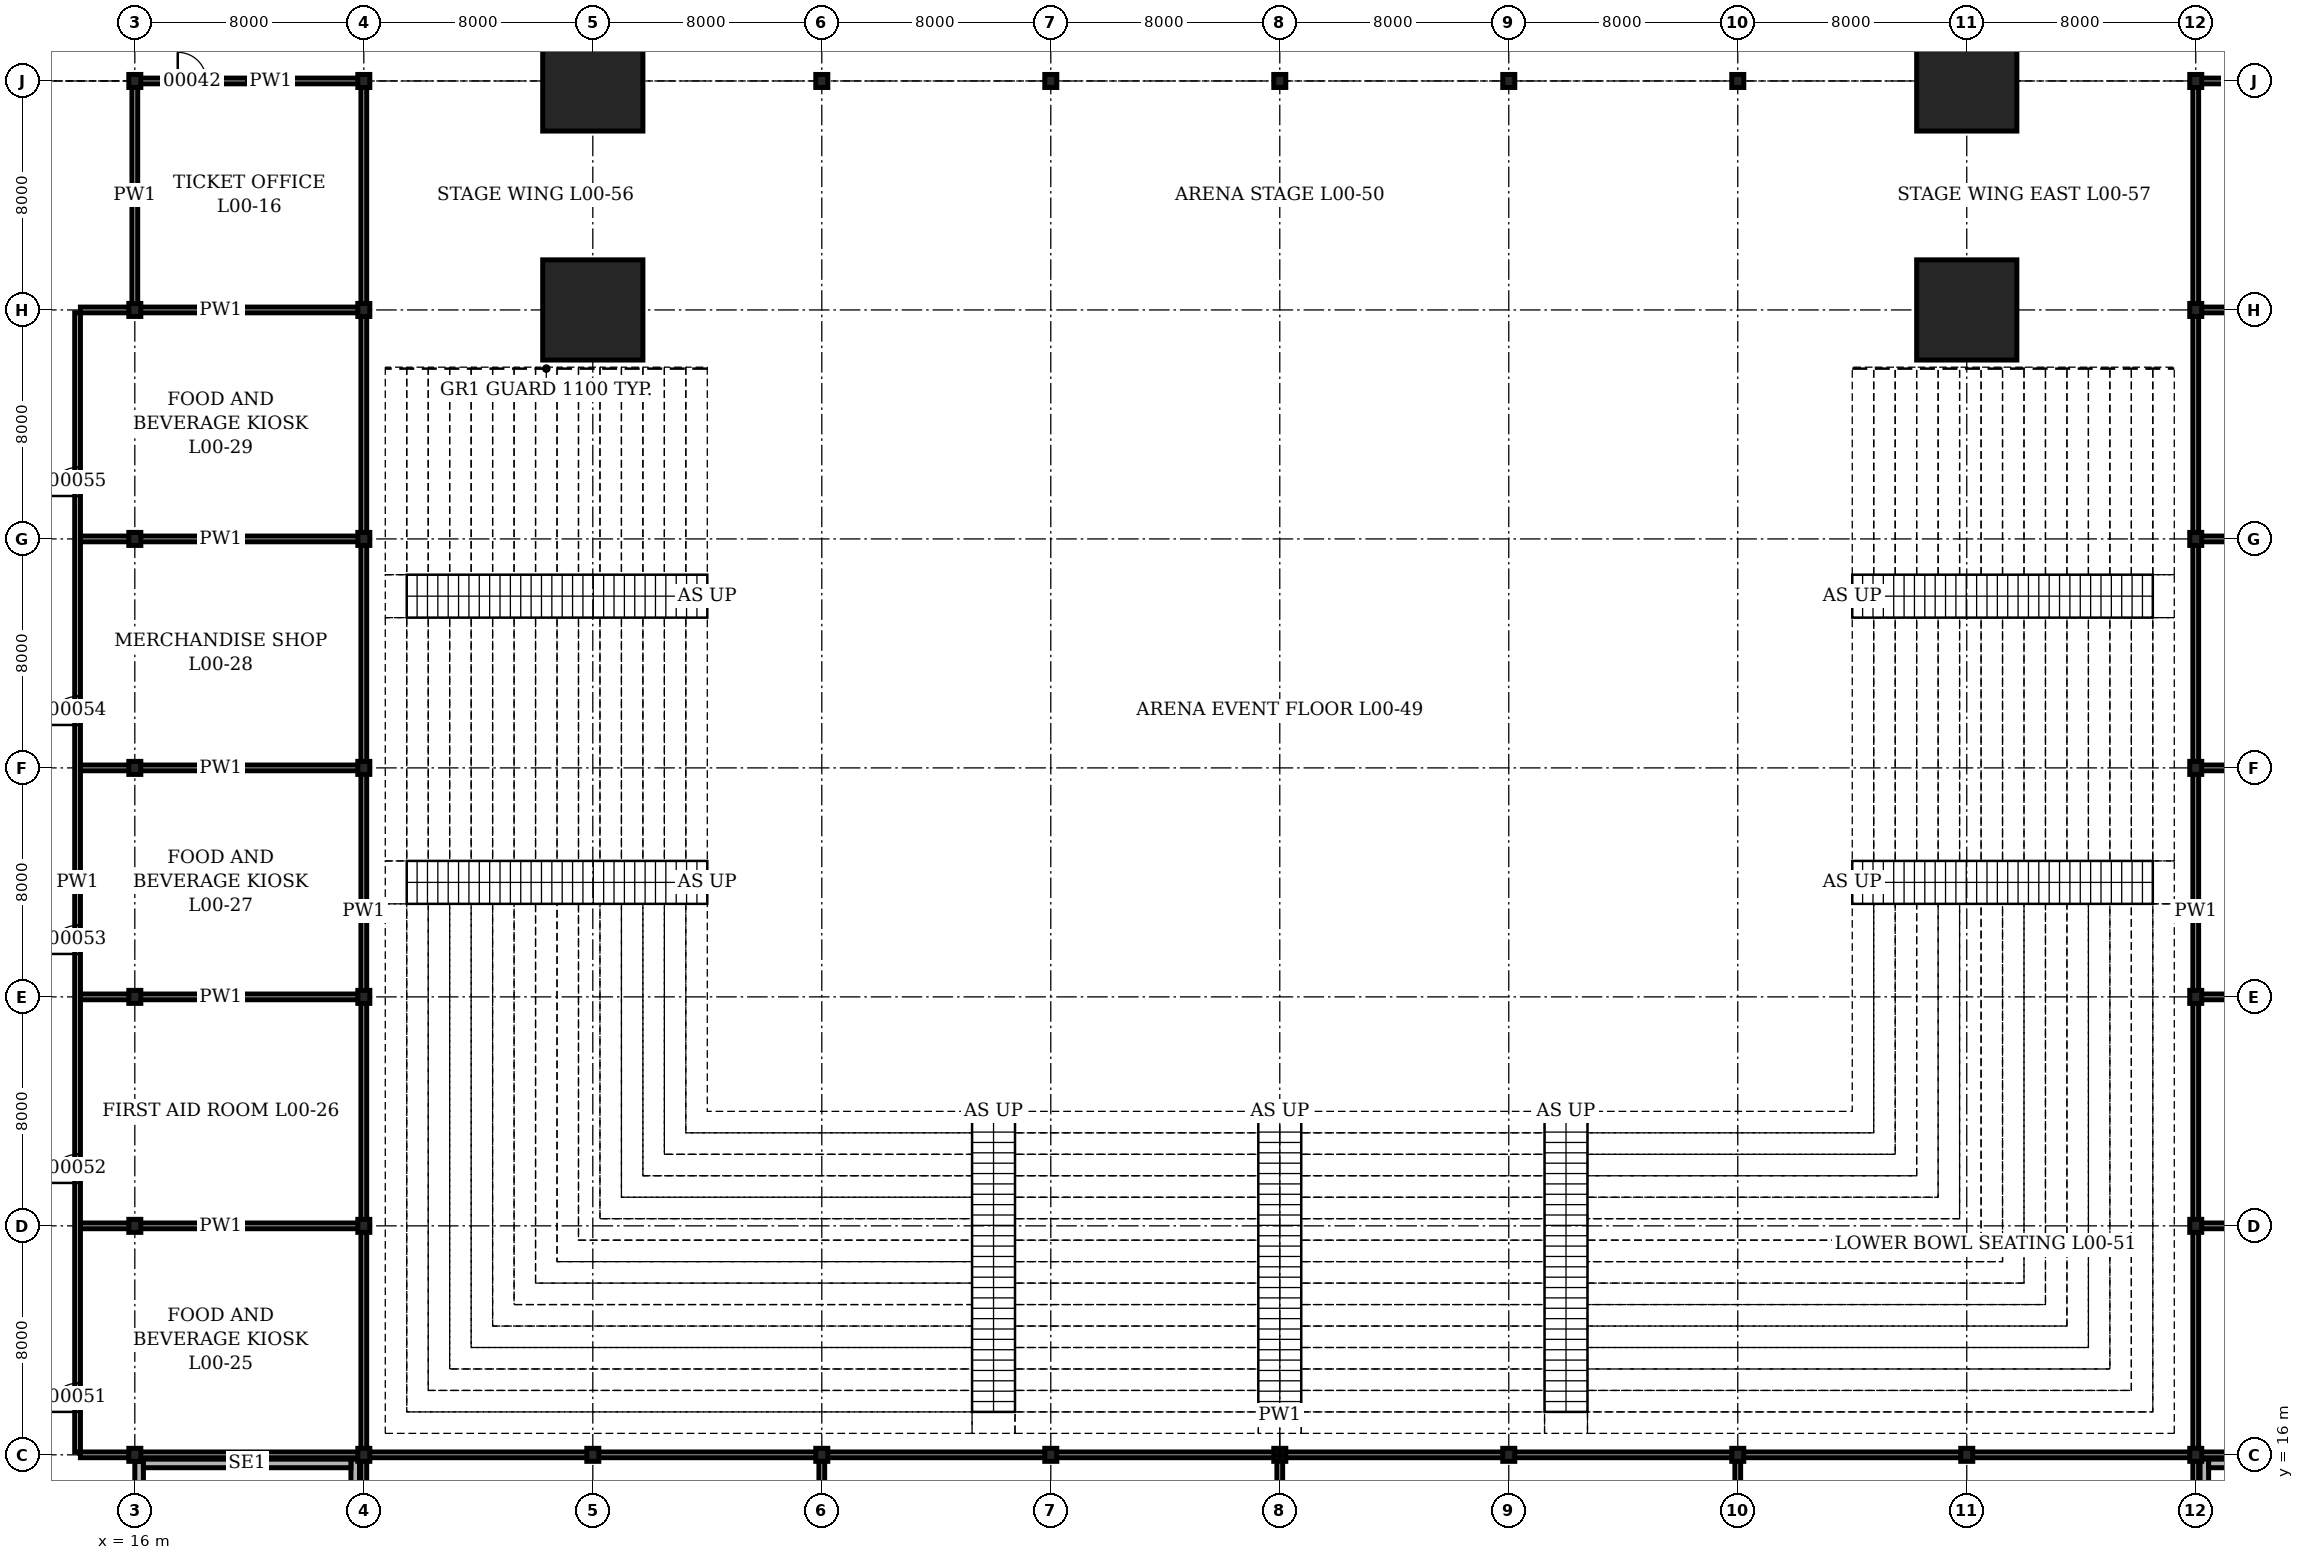
"""IFC4 building model, lengths in metres.
Left out: names, types, materials, properties, quantities, classifications, styles, units other than length and angle.
Written with IfcOpenShell. Run it as: python <this file> out.ifc"""

import sys

from ifc_helpers import new_model, si_unit, direction, frame, frame_2d, origin, origin_2d, place, context, subcontext, project, spatial, rectangle, hollow_rectangle, i_section, extrude, element, fill, save


model = new_model("IFC4")
c1 = context("Model", 3, precision=1e-05, world=origin(), true_north=direction((0.0, 1.0)))
c2 = subcontext(c1, "Body", "Model", "MODEL_VIEW")
j1 = project(units=[si_unit("LENGTHUNIT", "METRE"), si_unit("PLANEANGLEUNIT", "RADIAN")], contexts=[c1])
p1 = place(None, origin())
s1 = spatial("IfcSite", under=j1, at=p1, CompositionType="ELEMENT")
p2 = place(p1, origin())
s2 = spatial("IfcBuilding", under=s1, at=p2, CompositionType="ELEMENT")
p3 = place(p2, origin())
s3 = spatial("IfcBuildingStorey", under=s2, at=p3, CompositionType="ELEMENT", Elevation=0.0)
for number, where, z_axis, x_axis in (
    (1, (16.0, 16.0, 0.0), (0.0, 0.0, 1.0), (1.0, 0.0, 0.0)),
    (2, (16.0, 24.0, 0.0), (0.0, 0.0, 1.0), (1.0, 0.0, 0.0)),
    (3, (16.0, 32.0, 0.0), (0.0, 0.0, 1.0), (1.0, 0.0, 0.0)),
    (4, (16.0, 40.0, 0.0), (0.0, 0.0, 1.0), (1.0, 0.0, 0.0)),
    (5, (16.0, 48.0, 0.0), (0.0, 0.0, 1.0), (1.0, 0.0, 0.0)),
    (6, (16.0, 56.0, 0.0), (0.0, 0.0, 1.0), (1.0, 0.0, 0.0)),
    (7, (16.0, 64.0, 0.0), (0.0, 0.0, 1.0), (1.0, 0.0, 0.0)),
    (8, (24.0, 16.0, 0.0), (0.0, 0.0, 1.0), (1.0, 0.0, 0.0)),
    (9, (24.0, 24.0, 0.0), (0.0, 0.0, 1.0), (1.0, 0.0, 0.0)),
    (10, (24.0, 32.0, 0.0), (0.0, 0.0, 1.0), (1.0, 0.0, 0.0)),
    (11, (24.0, 40.0, 0.0), (0.0, 0.0, 1.0), (1.0, 0.0, 0.0)),
    (12, (24.0, 48.0, 0.0), (0.0, 0.0, 1.0), (1.0, 0.0, 0.0)),
    (13, (24.0, 56.0, 0.0), (0.0, 0.0, 1.0), (1.0, 0.0, 0.0)),
    (14, (24.0, 64.0, 0.0), (0.0, 0.0, 1.0), (1.0, 0.0, 0.0)),
    (15, (32.0, 16.0, 0.0), (0.0, 0.0, 1.0), (1.0, 0.0, 0.0)),
):
    element("IfcColumn", number, at=place(p3, frame(where, z_axis=z_axis, x_axis=x_axis)), inside=s3, PredefinedType="COLUMN", context=c2, shape_type="SweptSolid", body=[
        extrude(i_section(OverallWidth=0.419, OverallDepth=0.455, WebThickness=0.042, FlangeThickness=0.068, at=origin_2d()), origin(), (0.0, 0.0, 1.0), 4.9),
    ])
for number, where, z_axis, x_axis in (
    (16, (32.0, 56.0, 0.0), (0.0, 0.0, 1.0), (1.0, 0.0, 0.0)),
    (17, (32.0, 64.0, 0.0), (0.0, 0.0, 1.0), (1.0, 0.0, 0.0)),
):
    element("IfcColumn", number, at=place(p3, frame(where, z_axis=z_axis, x_axis=x_axis)), inside=s3, PredefinedType="COLUMN", context=c2, shape_type="SweptSolid", body=[
        extrude(hollow_rectangle(XDim=3.5, YDim=3.5, WallThickness=0.5, at=origin_2d()), origin(), (0.0, 0.0, 1.0), 4.9),
    ])
for number, where, z_axis, x_axis in (
    (18, (40.0, 16.0, 0.0), (0.0, 0.0, 1.0), (1.0, 0.0, 0.0)),
    (19, (40.0, 64.0, 0.0), (0.0, 0.0, 1.0), (1.0, 0.0, 0.0)),
    (20, (48.0, 16.0, 0.0), (0.0, 0.0, 1.0), (1.0, 0.0, 0.0)),
    (21, (48.0, 64.0, 0.0), (0.0, 0.0, 1.0), (1.0, 0.0, 0.0)),
    (22, (56.0, 16.0, 0.0), (0.0, 0.0, 1.0), (1.0, 0.0, 0.0)),
    (23, (56.0, 64.0, 0.0), (0.0, 0.0, 1.0), (1.0, 0.0, 0.0)),
    (24, (64.0, 16.0, 0.0), (0.0, 0.0, 1.0), (1.0, 0.0, 0.0)),
    (25, (64.0, 64.0, 0.0), (0.0, 0.0, 1.0), (1.0, 0.0, 0.0)),
    (26, (72.0, 16.0, 0.0), (0.0, 0.0, 1.0), (1.0, 0.0, 0.0)),
    (27, (72.0, 64.0, 0.0), (0.0, 0.0, 1.0), (1.0, 0.0, 0.0)),
    (28, (80.0, 16.0, 0.0), (0.0, 0.0, 1.0), (1.0, 0.0, 0.0)),
):
    element("IfcColumn", number, at=place(p3, frame(where, z_axis=z_axis, x_axis=x_axis)), inside=s3, PredefinedType="COLUMN", context=c2, shape_type="SweptSolid", body=[
        extrude(i_section(OverallWidth=0.419, OverallDepth=0.455, WebThickness=0.042, FlangeThickness=0.068, at=origin_2d()), origin(), (0.0, 0.0, 1.0), 4.9),
    ])
for number, where, z_axis, x_axis in (
    (29, (80.0, 56.0, 0.0), (0.0, 0.0, 1.0), (1.0, 0.0, 0.0)),
    (30, (80.0, 64.0, 0.0), (0.0, 0.0, 1.0), (1.0, 0.0, 0.0)),
):
    element("IfcColumn", number, at=place(p3, frame(where, z_axis=z_axis, x_axis=x_axis)), inside=s3, PredefinedType="COLUMN", context=c2, shape_type="SweptSolid", body=[
        extrude(hollow_rectangle(XDim=3.5, YDim=3.5, WallThickness=0.5, at=origin_2d()), origin(), (0.0, 0.0, 1.0), 4.9),
    ])
for number, where, z_axis, x_axis in (
    (31, (88.0, 16.0, 0.0), (0.0, 0.0, 1.0), (1.0, 0.0, 0.0)),
    (32, (88.0, 24.0, 0.0), (0.0, 0.0, 1.0), (1.0, 0.0, 0.0)),
    (33, (88.0, 32.0, 0.0), (0.0, 0.0, 1.0), (1.0, 0.0, 0.0)),
    (34, (88.0, 40.0, 0.0), (0.0, 0.0, 1.0), (1.0, 0.0, 0.0)),
    (35, (88.0, 48.0, 0.0), (0.0, 0.0, 1.0), (1.0, 0.0, 0.0)),
    (36, (88.0, 56.0, 0.0), (0.0, 0.0, 1.0), (1.0, 0.0, 0.0)),
    (37, (88.0, 64.0, 0.0), (0.0, 0.0, 1.0), (1.0, 0.0, 0.0)),
):
    element("IfcColumn", number, at=place(p3, frame(where, z_axis=z_axis, x_axis=x_axis)), inside=s3, PredefinedType="COLUMN", context=c2, shape_type="SweptSolid", body=[
        extrude(i_section(OverallWidth=0.419, OverallDepth=0.455, WebThickness=0.042, FlangeThickness=0.068, at=origin_2d()), origin(), (0.0, 0.0, 1.0), 4.9),
    ])
p4 = place(p3, frame((16.15, 5.0, 0.0), z_axis=(0.0, 0.0, 1.0), x_axis=(0.0, 1.0, 0.0)))
e38 = element("IfcWall", 38, at=p4, inside=s3, PredefinedType="SOLIDWALL", context=c2, shape_type="SweptSolid", body=[
    extrude(rectangle(XDim=10.773, YDim=0.3, at=frame_2d((5.386, 0.0))), origin(), (0.0, 0.0, 1.0), 4.7),
])
p5 = place(p3, frame((23.7, 5.0, 0.0), z_axis=(0.0, 0.0, 1.0), x_axis=(0.0, 1.0, 0.0)))
e39 = element("IfcWall", 39, at=p5, inside=s3, PredefinedType="SOLIDWALL", context=c2, shape_type="SweptSolid", body=[
    extrude(rectangle(XDim=10.85, YDim=0.3, at=frame_2d((5.425, 0.0))), origin(), (0.0, 0.0, 1.0), 4.7),
])
p6 = place(p3, frame((16.3, 15.7, 0.0), z_axis=(0.0, 0.0, 1.0), x_axis=(1.0, 0.0, 0.0)))
e40 = element("IfcWall", 40, at=p6, inside=s3, PredefinedType="SOLIDWALL", context=c2, shape_type="SweptSolid", body=[
    extrude(rectangle(XDim=7.25, YDim=0.3, at=frame_2d((3.625, 0.0))), origin(), (0.0, 0.0, 1.0), 4.7),
])
p7 = place(p3, frame((88.3, 5.0, 0.0), z_axis=(0.0, 0.0, 1.0), x_axis=(0.0, 1.0, 0.0)))
e41 = element("IfcWall", 41, at=p7, inside=s3, PredefinedType="SOLIDWALL", context=c2, shape_type="SweptSolid", body=[
    extrude(rectangle(XDim=10.85, YDim=0.3, at=frame_2d((5.425, 0.0))), origin(), (0.0, 0.0, 1.0), 4.7),
])
p8 = place(p3, frame((88.45, 15.7, 0.0), z_axis=(0.0, 0.0, 1.0), x_axis=(1.0, 0.0, 0.0)))
e42 = element("IfcWall", 42, at=p8, inside=s3, PredefinedType="SOLIDWALL", context=c2, shape_type="SweptSolid", body=[
    extrude(rectangle(XDim=7.25, YDim=0.3, at=frame_2d((3.625, 0.0))), origin(), (0.0, 0.0, 1.0), 4.7),
])
p9 = place(p3, frame((14.1, 16.0, 0.0), z_axis=(0.0, 0.0, 1.0), x_axis=(1.0, 0.0, 0.0)))
e43 = element("IfcWall", 43, at=p9, inside=s3, PredefinedType="PARTITIONING", context=c2, shape_type="SweptSolid", body=[
    extrude(rectangle(XDim=83.8, YDim=0.2, at=frame_2d((41.9, 0.0))), origin(), (0.0, 0.0, 1.0), 3.928),
])
for number, where, z_axis, x_axis in (
    (44, (14.1, 24.0, 0.0), (0.0, 0.0, 1.0), (1.0, 0.0, 0.0)),
    (45, (88.1, 24.0, 0.0), (0.0, 0.0, 1.0), (1.0, 0.0, 0.0)),
    (46, (14.1, 32.0, 0.0), (0.0, 0.0, 1.0), (1.0, 0.0, 0.0)),
    (47, (88.1, 32.0, 0.0), (0.0, 0.0, 1.0), (1.0, 0.0, 0.0)),
    (48, (14.1, 40.0, 0.0), (0.0, 0.0, 1.0), (1.0, 0.0, 0.0)),
    (49, (88.1, 40.0, 0.0), (0.0, 0.0, 1.0), (1.0, 0.0, 0.0)),
    (50, (14.1, 48.0, 0.0), (0.0, 0.0, 1.0), (1.0, 0.0, 0.0)),
    (51, (88.1, 48.0, 0.0), (0.0, 0.0, 1.0), (1.0, 0.0, 0.0)),
    (52, (14.1, 56.0, 0.0), (0.0, 0.0, 1.0), (1.0, 0.0, 0.0)),
    (53, (88.1, 56.0, 0.0), (0.0, 0.0, 1.0), (1.0, 0.0, 0.0)),
):
    element("IfcWall", number, at=place(p3, frame(where, z_axis=z_axis, x_axis=x_axis)), inside=s3, PredefinedType="PARTITIONING", context=c2, shape_type="SweptSolid", body=[
        extrude(rectangle(XDim=9.8, YDim=0.2, at=frame_2d((4.9, 0.0))), origin(), (0.0, 0.0, 1.0), 3.928),
    ])
p10 = place(p3, frame((16.1, 64.0, 0.0), z_axis=(0.0, 0.0, 1.0), x_axis=(1.0, 0.0, 0.0)))
e54 = element("IfcWall", 54, at=p10, inside=s3, PredefinedType="PARTITIONING", context=c2, shape_type="SweptSolid", body=[
    extrude(rectangle(XDim=7.8, YDim=0.2, at=frame_2d((3.9, 0.0))), origin(), (0.0, 0.0, 1.0), 3.928),
])
p11 = place(p10, frame((1.4, 0.0, 0.0)))
e55 = element("IfcOpeningElement", 55, at=p11, cuts=e54, PredefinedType="OPENING", context=c2, shape_type="SweptSolid", body=[
    extrude(rectangle(XDim=1.0, YDim=2.1, at=frame_2d((0.5, 1.05))), frame((0.0, 0.11, 0.0), z_axis=(0.0, -1.0, 0.0), x_axis=(1.0, 0.0, 0.0)), (0.0, 0.0, 1.0), 0.22),
])
p12 = place(p3, frame((88.1, 64.0, 0.0), z_axis=(0.0, 0.0, 1.0), x_axis=(1.0, 0.0, 0.0)))
e56 = element("IfcWall", 56, at=p12, inside=s3, PredefinedType="PARTITIONING", context=c2, shape_type="SweptSolid", body=[
    extrude(rectangle(XDim=7.8, YDim=0.2, at=frame_2d((3.9, 0.0))), origin(), (0.0, 0.0, 1.0), 3.928),
])
p13 = place(p12, frame((1.4, 0.0, 0.0)))
e57 = element("IfcOpeningElement", 57, at=p13, cuts=e56, PredefinedType="OPENING", context=c2, shape_type="SweptSolid", body=[
    extrude(rectangle(XDim=1.0, YDim=2.1, at=frame_2d((0.5, 1.05))), frame((0.0, 0.11, 0.0), z_axis=(0.0, -1.0, 0.0), x_axis=(1.0, 0.0, 0.0)), (0.0, 0.0, 1.0), 0.22),
])
p14 = place(p3, frame((14.0, 16.1, 0.0), z_axis=(0.0, 0.0, 1.0), x_axis=(0.0, 1.0, 0.0)))
e58 = element("IfcWall", 58, at=p14, inside=s3, PredefinedType="PARTITIONING", context=c2, shape_type="SweptSolid", body=[
    extrude(rectangle(XDim=39.8, YDim=0.2, at=frame_2d((19.9, 0.0))), origin(), (0.0, 0.0, 1.0), 4.7),
])
p15 = place(p14, frame((1.4, 0.0, 0.0)))
e59 = element("IfcOpeningElement", 59, at=p15, cuts=e58, PredefinedType="OPENING", context=c2, shape_type="SweptSolid", body=[
    extrude(rectangle(XDim=1.0, YDim=2.1, at=frame_2d((0.5, 1.05))), frame((0.0, 0.11, 0.0), z_axis=(0.0, -1.0, 0.0), x_axis=(1.0, 0.0, 0.0)), (0.0, 0.0, 1.0), 0.22),
])
p16 = place(p14, frame((9.4, 0.0, 0.0)))
e60 = element("IfcOpeningElement", 60, at=p16, cuts=e58, PredefinedType="OPENING", context=c2, shape_type="SweptSolid", body=[
    extrude(rectangle(XDim=1.0, YDim=2.1, at=frame_2d((0.5, 1.05))), frame((0.0, 0.11, 0.0), z_axis=(0.0, -1.0, 0.0), x_axis=(1.0, 0.0, 0.0)), (0.0, 0.0, 1.0), 0.22),
])
p17 = place(p14, frame((17.4, 0.0, 0.0)))
e61 = element("IfcOpeningElement", 61, at=p17, cuts=e58, PredefinedType="OPENING", context=c2, shape_type="SweptSolid", body=[
    extrude(rectangle(XDim=1.0, YDim=2.1, at=frame_2d((0.5, 1.05))), frame((0.0, 0.11, 0.0), z_axis=(0.0, -1.0, 0.0), x_axis=(1.0, 0.0, 0.0)), (0.0, 0.0, 1.0), 0.22),
])
p18 = place(p14, frame((25.4, 0.0, 0.0)))
e62 = element("IfcOpeningElement", 62, at=p18, cuts=e58, PredefinedType="OPENING", context=c2, shape_type="SweptSolid", body=[
    extrude(rectangle(XDim=1.0, YDim=2.1, at=frame_2d((0.5, 1.05))), frame((0.0, 0.11, 0.0), z_axis=(0.0, -1.0, 0.0), x_axis=(1.0, 0.0, 0.0)), (0.0, 0.0, 1.0), 0.22),
])
p19 = place(p14, frame((33.4, 0.0, 0.0)))
e63 = element("IfcOpeningElement", 63, at=p19, cuts=e58, PredefinedType="OPENING", context=c2, shape_type="SweptSolid", body=[
    extrude(rectangle(XDim=1.0, YDim=2.1, at=frame_2d((0.5, 1.05))), frame((0.0, 0.11, 0.0), z_axis=(0.0, -1.0, 0.0), x_axis=(1.0, 0.0, 0.0)), (0.0, 0.0, 1.0), 0.22),
])
p20 = place(p3, frame((16.0, 56.1, 0.0), z_axis=(0.0, 0.0, 1.0), x_axis=(0.0, 1.0, 0.0)))
e64 = element("IfcWall", 64, at=p20, inside=s3, PredefinedType="PARTITIONING", context=c2, shape_type="SweptSolid", body=[
    extrude(rectangle(XDim=7.8, YDim=0.2, at=frame_2d((3.9, 0.0))), origin(), (0.0, 0.0, 1.0), 3.928),
])
p21 = place(p3, frame((24.0, 6.1, 0.0), z_axis=(0.0, 0.0, 1.0), x_axis=(0.0, 1.0, 0.0)))
e65 = element("IfcWall", 65, at=p21, inside=s3, PredefinedType="PARTITIONING", context=c2, shape_type="SweptSolid", body=[
    extrude(rectangle(XDim=57.8, YDim=0.2, at=frame_2d((28.9, 0.0))), origin(), (0.0, 0.0, 1.0), 3.928),
])
for number, where, z_axis, x_axis in (
    (66, (40.0, 6.1, 0.0), (0.0, 0.0, 1.0), (0.0, 1.0, 0.0)),
    (67, (56.0, 6.1, 0.0), (0.0, 0.0, 1.0), (0.0, 1.0, 0.0)),
    (68, (72.0, 6.1, 0.0), (0.0, 0.0, 1.0), (0.0, 1.0, 0.0)),
):
    element("IfcWall", number, at=place(p3, frame(where, z_axis=z_axis, x_axis=x_axis)), inside=s3, PredefinedType="PARTITIONING", context=c2, shape_type="SweptSolid", body=[
        extrude(rectangle(XDim=9.8, YDim=0.2, at=frame_2d((4.9, 0.0))), origin(), (0.0, 0.0, 1.0), 3.928),
    ])
p22 = place(p3, frame((88.0, 6.1, 0.0), z_axis=(0.0, 0.0, 1.0), x_axis=(0.0, 1.0, 0.0)))
e69 = element("IfcWall", 69, at=p22, inside=s3, PredefinedType="PARTITIONING", context=c2, shape_type="SweptSolid", body=[
    extrude(rectangle(XDim=57.8, YDim=0.2, at=frame_2d((28.9, 0.0))), origin(), (0.0, 0.0, 1.0), 3.928),
])
p23 = place(p11, origin())
e70 = element("IfcDoor", 70, at=p23, inside=s3, OperationType="SINGLE_SWING_LEFT", PredefinedType="DOOR", context=c2, shape_type="SweptSolid", body=[
    extrude(rectangle(XDim=1.0, YDim=2.1, at=frame_2d((0.5, 1.05))), frame((0.0, 0.1, 0.0), z_axis=(0.0, -1.0, 0.0), x_axis=(1.0, 0.0, 0.0)), (0.0, 0.0, 1.0), 0.199),
])
fill(e55, e70)
p24 = place(p15, origin())
e71 = element("IfcDoor", 71, at=p24, inside=s3, OperationType="SINGLE_SWING_LEFT", PredefinedType="DOOR", context=c2, shape_type="SweptSolid", body=[
    extrude(rectangle(XDim=1.0, YDim=2.1, at=frame_2d((0.5, 1.05))), frame((0.0, 0.1, 0.0), z_axis=(0.0, -1.0, 0.0), x_axis=(1.0, 0.0, 0.0)), (0.0, 0.0, 1.0), 0.199),
])
fill(e59, e71)
p25 = place(p16, origin())
e72 = element("IfcDoor", 72, at=p25, inside=s3, OperationType="SINGLE_SWING_LEFT", PredefinedType="DOOR", context=c2, shape_type="SweptSolid", body=[
    extrude(rectangle(XDim=1.0, YDim=2.1, at=frame_2d((0.5, 1.05))), frame((0.0, 0.1, 0.0), z_axis=(0.0, -1.0, 0.0), x_axis=(1.0, 0.0, 0.0)), (0.0, 0.0, 1.0), 0.199),
])
fill(e60, e72)
p26 = place(p17, origin())
e73 = element("IfcDoor", 73, at=p26, inside=s3, OperationType="SINGLE_SWING_LEFT", PredefinedType="DOOR", context=c2, shape_type="SweptSolid", body=[
    extrude(rectangle(XDim=1.0, YDim=2.1, at=frame_2d((0.5, 1.05))), frame((0.0, 0.1, 0.0), z_axis=(0.0, -1.0, 0.0), x_axis=(1.0, 0.0, 0.0)), (0.0, 0.0, 1.0), 0.199),
])
fill(e61, e73)
p27 = place(p18, origin())
e74 = element("IfcDoor", 74, at=p27, inside=s3, OperationType="SINGLE_SWING_LEFT", PredefinedType="DOOR", context=c2, shape_type="SweptSolid", body=[
    extrude(rectangle(XDim=1.0, YDim=2.1, at=frame_2d((0.5, 1.05))), frame((0.0, 0.1, 0.0), z_axis=(0.0, -1.0, 0.0), x_axis=(1.0, 0.0, 0.0)), (0.0, 0.0, 1.0), 0.199),
])
fill(e62, e74)
p28 = place(p19, origin())
e75 = element("IfcDoor", 75, at=p28, inside=s3, OperationType="SINGLE_SWING_LEFT", PredefinedType="DOOR", context=c2, shape_type="SweptSolid", body=[
    extrude(rectangle(XDim=1.0, YDim=2.1, at=frame_2d((0.5, 1.05))), frame((0.0, 0.1, 0.0), z_axis=(0.0, -1.0, 0.0), x_axis=(1.0, 0.0, 0.0)), (0.0, 0.0, 1.0), 0.199),
])
fill(e63, e75)
save(model, sys.argv[1])
